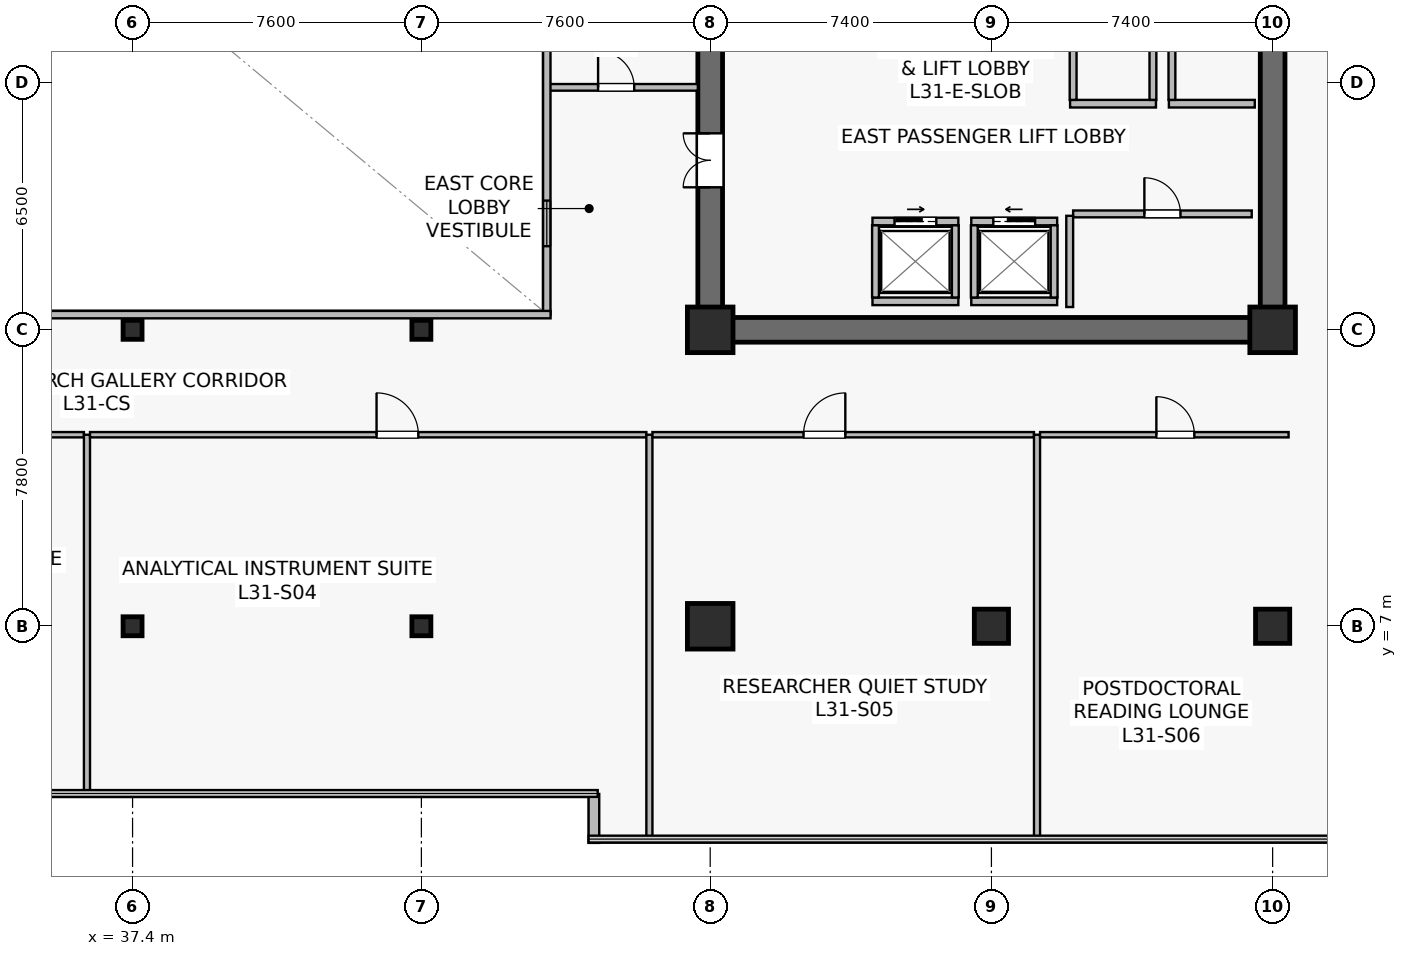
"""IFC4 building model, lengths in metres.
Left out: names, types, materials, properties, quantities, classifications, styles, units other than length and angle.
Written with IfcOpenShell. Run it as: python <this file> out.ifc"""

import sys

from ifc_helpers import new_model, si_unit, direction, frame, frame_2d, origin, origin_2d, place, context, subcontext, project, spatial, rectangle, hollow_rectangle, extrude, source, transform, mapped, element, fill, save


model = new_model("IFC4")
c1 = context("Model", 3, precision=1e-05, world=origin(), true_north=direction((0.0, 1.0)))
c2 = subcontext(c1, "Body", "Model", "MODEL_VIEW")
j1 = project(units=[si_unit("LENGTHUNIT", "METRE"), si_unit("PLANEANGLEUNIT", "RADIAN")], contexts=[c1])
p1 = place(None, origin())
s1 = spatial("IfcSite", under=j1, at=p1, CompositionType="ELEMENT")
p2 = place(p1, origin())
s2 = spatial("IfcBuilding", under=s1, at=p2, CompositionType="ELEMENT")
p3 = place(p2, frame((0.0, 0.0, 129.7)))
s3 = spatial("IfcBuildingStorey", under=s2, at=p3, CompositionType="ELEMENT", Elevation=129.7)
p4 = place(p3, frame((52.275, 14.8, 0.0), z_axis=(0.0, 0.0, 1.0), x_axis=(1.0, 0.0, 0.0)))
e1 = element("IfcWall", 1, at=p4, inside=s3, PredefinedType="SHEAR", context=c2, shape_type="SweptSolid", body=[
    extrude(rectangle(XDim=15.45, YDim=0.65, at=frame_2d((7.725, 0.0))), origin(), (0.0, 0.0, 1.0), 3.79),
])
p5 = place(p3, frame((52.6, 15.125, 0.0), z_axis=(0.0, 0.0, 1.0), x_axis=(0.0, 1.0, 0.0)))
e2 = element("IfcWall", 2, at=p5, inside=s3, PredefinedType="SHEAR", context=c2, shape_type="SweptSolid", body=[
    extrude(rectangle(XDim=18.35, YDim=0.65, at=frame_2d((9.175, 0.0))), origin(), (0.0, 0.0, 1.0), 3.79),
])
p6 = place(p5, frame((3.425, 0.0, 0.0)))
e3 = element("IfcOpeningElement", 3, at=p6, cuts=e2, PredefinedType="OPENING", context=c2, shape_type="SweptSolid", body=[
    extrude(rectangle(XDim=1.42, YDim=2.2, at=frame_2d((0.71, 1.1))), frame((0.0, 0.335, 0.0), z_axis=(0.0, -1.0, 0.0), x_axis=(1.0, 0.0, 0.0)), (0.0, 0.0, 1.0), 0.67),
])
p7 = place(p3, frame((67.4, 15.125, 0.0), z_axis=(0.0, 0.0, 1.0), x_axis=(0.0, 1.0, 0.0)))
e4 = element("IfcWall", 4, at=p7, inside=s3, PredefinedType="SHEAR", context=c2, shape_type="SweptSolid", body=[
    extrude(rectangle(XDim=18.35, YDim=0.65, at=frame_2d((9.175, 0.0))), origin(), (0.0, 0.0, 1.0), 3.79),
])
m1 = source(origin(), c2, "Body", "SweptSolid", [
    extrude(rectangle(XDim=1.2, YDim=1.2, at=origin_2d()), origin(), (0.0, 0.0, 1.0), 4.1),
])
p8 = place(p3, frame((52.6, 7.0, 0.0), z_axis=(0.0, 0.0, 1.0), x_axis=(1.0, 0.0, 0.0)))
e5 = element("IfcColumn", 5, at=p8, inside=s3, PredefinedType="COLUMN", context=c2, shape_type="MappedRepresentation", body=[
    mapped(m1, transform((0.0, 0.0, 0.0), scale=1.0)),
])
m2 = source(origin(), c2, "Body", "SweptSolid", [
    extrude(rectangle(XDim=0.9, YDim=0.9, at=origin_2d()), origin(), (0.0, 0.0, 1.0), 4.1),
])
p9 = place(p3, frame((60.0, 7.0, 0.0), z_axis=(0.0, 0.0, 1.0), x_axis=(1.0, 0.0, 0.0)))
e6 = element("IfcColumn", 6, at=p9, inside=s3, PredefinedType="COLUMN", context=c2, shape_type="MappedRepresentation", body=[
    mapped(m2, transform((0.0, 0.0, 0.0), scale=1.0)),
])
for number, where, z_axis, x_axis in (
    (7, (52.6, 14.8, 0.0), (0.0, 0.0, 1.0), (1.0, 0.0, 0.0)),
    (8, (67.4, 14.8, 0.0), (0.0, 0.0, 1.0), (1.0, 0.0, 0.0)),
):
    element("IfcColumn", number, at=place(p3, frame(where, z_axis=z_axis, x_axis=x_axis)), inside=s3, PredefinedType="COLUMN", context=c2, shape_type="MappedRepresentation", body=[
        mapped(m1, transform((0.0, 0.0, 0.0), scale=1.0)),
    ])
p10 = place(p3, frame((67.4, 7.0, 0.0), z_axis=(0.0, 0.0, 1.0), x_axis=(1.0, 0.0, 0.0)))
e9 = element("IfcColumn", 9, at=p10, inside=s3, PredefinedType="COLUMN", context=c2, shape_type="MappedRepresentation", body=[
    mapped(m2, transform((0.0, 0.0, 0.0), scale=1.0)),
])
m3 = source(origin(), c2, "Body", "SweptSolid", [
    extrude(hollow_rectangle(XDim=0.5, YDim=0.5, WallThickness=0.022, at=origin_2d()), origin(), (0.0, 0.0, 1.0), 4.1),
])
for number, where, z_axis, x_axis in (
    (10, (37.4, 7.0, 0.0), (0.0, 0.0, 1.0), (1.0, 0.0, 0.0)),
    (11, (37.4, 14.8, 0.0), (0.0, 0.0, 1.0), (1.0, 0.0, 0.0)),
    (12, (45.0, 7.0, 0.0), (0.0, 0.0, 1.0), (1.0, 0.0, 0.0)),
    (13, (45.0, 14.8, 0.0), (0.0, 0.0, 1.0), (1.0, 0.0, 0.0)),
):
    element("IfcColumn", number, at=place(p3, frame(where, z_axis=z_axis, x_axis=x_axis)), inside=s3, PredefinedType="COLUMN", context=c2, shape_type="MappedRepresentation", body=[
        mapped(m3, transform((0.0, 0.0, 0.0), scale=1.0)),
    ])
p11 = place(p3, frame((49.54, 2.588, 0.0), z_axis=(0.0, 0.0, 1.0), x_axis=(0.0, -1.0, 0.0)))
e14 = element("IfcWall", 14, at=p11, inside=s3, PredefinedType="STANDARD", context=c2, shape_type="SweptSolid", body=[
    extrude(rectangle(XDim=1.288, YDim=0.28, at=frame_2d((0.644, 0.0))), origin(), (0.0, 0.0, 1.0), 3.79),
])
p12 = place(p3, frame((59.47, 17.65, 0.0), z_axis=(0.0, 0.0, 1.0), x_axis=(1.0, 0.0, 0.0)))
e15 = element("IfcWall", 15, at=p12, inside=s3, PredefinedType="SOLIDWALL", context=c2, shape_type="SweptSolid", body=[
    extrude(rectangle(XDim=2.26, YDim=0.2, at=frame_2d((1.13, 0.0))), origin(), (0.0, 0.0, 1.0), 3.125),
])
p13 = place(p12, frame((0.58, 0.0, 0.0)))
e16 = element("IfcOpeningElement", 16, at=p13, cuts=e15, PredefinedType="OPENING", context=c2, shape_type="SweptSolid", body=[
    extrude(rectangle(XDim=1.1, YDim=2.22, at=frame_2d((0.55, 1.11))), frame((0.0, 0.11, 0.0), z_axis=(0.0, -1.0, 0.0), x_axis=(1.0, 0.0, 0.0)), (0.0, 0.0, 1.0), 0.22),
])
p14 = place(p3, frame((59.47, 15.55, 0.0), z_axis=(0.0, 0.0, 1.0), x_axis=(1.0, 0.0, 0.0)))
e17 = element("IfcWall", 17, at=p14, inside=s3, PredefinedType="SOLIDWALL", context=c2, shape_type="SweptSolid", body=[
    extrude(rectangle(XDim=2.26, YDim=0.2, at=frame_2d((1.13, 0.0))), origin(), (0.0, 0.0, 1.0), 3.125),
])
for number, where, z_axis, x_axis in (
    (18, (59.55, 15.65, 0.0), (0.0, 0.0, 1.0), (0.0, 1.0, 0.0)),
    (19, (61.65, 15.65, 0.0), (0.0, 0.0, 1.0), (0.0, 1.0, 0.0)),
):
    element("IfcWall", number, at=place(p3, frame(where, z_axis=z_axis, x_axis=x_axis)), inside=s3, PredefinedType="SOLIDWALL", context=c2, shape_type="SweptSolid", body=[
        extrude(rectangle(XDim=1.9, YDim=0.18, at=frame_2d((0.95, 0.0))), origin(), (0.0, 0.0, 1.0), 3.79),
    ])
p15 = place(p3, frame((56.87, 17.65, 0.0), z_axis=(0.0, 0.0, 1.0), x_axis=(1.0, 0.0, 0.0)))
e20 = element("IfcWall", 20, at=p15, inside=s3, PredefinedType="SOLIDWALL", context=c2, shape_type="SweptSolid", body=[
    extrude(rectangle(XDim=2.26, YDim=0.2, at=frame_2d((1.13, 0.0))), origin(), (0.0, 0.0, 1.0), 3.79),
])
p16 = place(p15, frame((0.58, 0.0, 0.0)))
e21 = element("IfcOpeningElement", 21, at=p16, cuts=e20, PredefinedType="OPENING", context=c2, shape_type="SweptSolid", body=[
    extrude(rectangle(XDim=1.1, YDim=2.22, at=frame_2d((0.55, 1.11))), frame((0.0, 0.11, 0.0), z_axis=(0.0, -1.0, 0.0), x_axis=(1.0, 0.0, 0.0)), (0.0, 0.0, 1.0), 0.22),
])
p17 = place(p3, frame((56.87, 15.55, 0.0), z_axis=(0.0, 0.0, 1.0), x_axis=(1.0, 0.0, 0.0)))
e22 = element("IfcWall", 22, at=p17, inside=s3, PredefinedType="SOLIDWALL", context=c2, shape_type="SweptSolid", body=[
    extrude(rectangle(XDim=2.26, YDim=0.2, at=frame_2d((1.13, 0.0))), origin(), (0.0, 0.0, 1.0), 3.79),
])
for number, where, z_axis, x_axis in (
    (23, (56.95, 15.65, 0.0), (0.0, 0.0, 1.0), (0.0, 1.0, 0.0)),
    (24, (59.05, 15.65, 0.0), (0.0, 0.0, 1.0), (0.0, 1.0, 0.0)),
):
    element("IfcWall", number, at=place(p3, frame(where, z_axis=z_axis, x_axis=x_axis)), inside=s3, PredefinedType="SOLIDWALL", context=c2, shape_type="SweptSolid", body=[
        extrude(rectangle(XDim=1.9, YDim=0.18, at=frame_2d((0.95, 0.0))), origin(), (0.0, 0.0, 1.0), 3.79),
    ])
p18 = place(p3, frame((64.67, 20.75, 0.0), z_axis=(0.0, 0.0, 1.0), x_axis=(1.0, 0.0, 0.0)))
e25 = element("IfcWall", 25, at=p18, inside=s3, PredefinedType="SOLIDWALL", context=c2, shape_type="SweptSolid", body=[
    extrude(rectangle(XDim=2.26, YDim=0.2, at=frame_2d((1.13, 0.0))), origin(), (0.0, 0.0, 1.0), 3.79),
])
p19 = place(p3, frame((64.75, 20.85, 0.0), z_axis=(0.0, 0.0, 1.0), x_axis=(0.0, 1.0, 0.0)))
e26 = element("IfcWall", 26, at=p19, inside=s3, PredefinedType="SOLIDWALL", context=c2, shape_type="SweptSolid", body=[
    extrude(rectangle(XDim=1.9, YDim=0.18, at=frame_2d((0.95, 0.0))), origin(), (0.0, 0.0, 1.0), 3.79),
])
p20 = place(p3, frame((62.07, 20.75, 0.0), z_axis=(0.0, 0.0, 1.0), x_axis=(1.0, 0.0, 0.0)))
e27 = element("IfcWall", 27, at=p20, inside=s3, PredefinedType="SOLIDWALL", context=c2, shape_type="SweptSolid", body=[
    extrude(rectangle(XDim=2.26, YDim=0.2, at=frame_2d((1.13, 0.0))), origin(), (0.0, 0.0, 1.0), 3.79),
])
for number, where, z_axis, x_axis in (
    (28, (62.15, 20.85, 0.0), (0.0, 0.0, 1.0), (0.0, 1.0, 0.0)),
    (29, (64.25, 20.85, 0.0), (0.0, 0.0, 1.0), (0.0, 1.0, 0.0)),
):
    element("IfcWall", number, at=place(p3, frame(where, z_axis=z_axis, x_axis=x_axis)), inside=s3, PredefinedType="SOLIDWALL", context=c2, shape_type="SweptSolid", body=[
        extrude(rectangle(XDim=1.9, YDim=0.18, at=frame_2d((0.95, 0.0))), origin(), (0.0, 0.0, 1.0), 3.79),
    ])
p21 = place(p3, frame((62.15, 17.85, 0.0), z_axis=(0.0, 0.0, 1.0), x_axis=(1.0, 0.0, 0.0)))
e30 = element("IfcWall", 30, at=p21, inside=s3, PredefinedType="SOLIDWALL", context=c2, shape_type="SweptSolid", body=[
    extrude(rectangle(XDim=4.7, YDim=0.18, at=frame_2d((2.35, 0.0))), origin(), (0.0, 0.0, 1.0), 3.79),
])
p22 = place(p21, frame((1.875, 0.0, 0.0)))
e31 = element("IfcOpeningElement", 31, at=p22, cuts=e30, PredefinedType="OPENING", context=c2, shape_type="SweptSolid", body=[
    extrude(rectangle(XDim=0.95, YDim=2.15, at=frame_2d((0.475, 1.075))), frame((0.0, 0.1, 0.0), z_axis=(0.0, -1.0, 0.0), x_axis=(1.0, 0.0, 0.0)), (0.0, 0.0, 1.0), 0.2),
])
p23 = place(p3, frame((62.06, 15.4, 0.0), z_axis=(0.0, 0.0, 1.0), x_axis=(0.0, 1.0, 0.0)))
e32 = element("IfcWall", 32, at=p23, inside=s3, PredefinedType="SOLIDWALL", context=c2, shape_type="SweptSolid", body=[
    extrude(rectangle(XDim=2.4, YDim=0.18, at=frame_2d((1.2, 0.0))), origin(), (0.0, 0.0, 1.0), 3.79),
])
p24 = place(p3, frame((48.3, 21.18, 0.0), z_axis=(0.0, 0.0, 1.0), x_axis=(1.0, 0.0, 0.0)))
e33 = element("IfcWall", 33, at=p24, inside=s3, PredefinedType="PARTITIONING", context=c2, shape_type="SweptSolid", body=[
    extrude(rectangle(XDim=3.975, YDim=0.175, at=frame_2d((1.987, 0.0))), origin(), (0.0, 0.0, 1.0), 3.79),
])
p25 = place(p24, frame((1.35, 0.0, 0.0)))
e34 = element("IfcOpeningElement", 34, at=p25, cuts=e33, PredefinedType="OPENING", context=c2, shape_type="SweptSolid", body=[
    extrude(rectangle(XDim=0.95, YDim=2.15, at=frame_2d((0.475, 1.075))), frame((0.0, 0.098, 0.0), z_axis=(0.0, -1.0, 0.0), x_axis=(1.0, 0.0, 0.0)), (0.0, 0.0, 1.0), 0.195),
])
p26 = place(p3, frame((48.3, 15.2, 0.0), z_axis=(0.0, 0.0, 1.0), x_axis=(0.0, 1.0, 0.0)))
e35 = element("IfcWall", 35, at=p26, inside=s3, PredefinedType="SOLIDWALL", context=c2, shape_type="SweptSolid", body=[
    extrude(rectangle(XDim=18.2, YDim=0.195, at=frame_2d((9.1, 0.0))), origin(), (0.0, 0.0, 1.0), 3.79),
])
p27 = place(p26, frame((1.8, 0.0, 0.9)))
e36 = element("IfcOpeningElement", 36, at=p27, cuts=e35, PredefinedType="OPENING", context=c2, shape_type="SweptSolid", body=[
    extrude(rectangle(XDim=1.2, YDim=1.35, at=frame_2d((0.6, 0.675))), frame((0.0, 0.107, 0.0), z_axis=(0.0, -1.0, 0.0), x_axis=(1.0, 0.0, 0.0)), (0.0, 0.0, 1.0), 0.215),
])
p28 = place(p26, frame((13.2, 0.0, 0.9)))
e37 = element("IfcOpeningElement", 37, at=p28, cuts=e35, PredefinedType="OPENING", context=c2, shape_type="SweptSolid", body=[
    extrude(rectangle(XDim=1.2, YDim=1.35, at=frame_2d((0.6, 0.675))), frame((0.0, 0.107, 0.0), z_axis=(0.0, -1.0, 0.0), x_axis=(1.0, 0.0, 0.0)), (0.0, 0.0, 1.0), 0.215),
])
p29 = place(p3, frame((26.4, 15.2, 0.0), z_axis=(0.0, 0.0, 1.0), x_axis=(1.0, 0.0, 0.0)))
e38 = element("IfcWall", 38, at=p29, inside=s3, PredefinedType="SOLIDWALL", context=c2, shape_type="SweptSolid", body=[
    extrude(rectangle(XDim=22.0, YDim=0.195, at=frame_2d((11.0, 0.0))), origin(), (0.0, 0.0, 1.0), 3.79),
])
p30 = place(p3, frame((23.48, 12.04, 0.0), z_axis=(0.0, 0.0, 1.0), x_axis=(1.0, 0.0, 0.0)))
e39 = element("IfcWall", 39, at=p30, inside=s3, PredefinedType="PARTITIONING", context=c2, shape_type="SweptSolid", body=[
    extrude(rectangle(XDim=12.64, YDim=0.14, at=frame_2d((6.32, 0.0))), origin(), (0.0, 0.0, 1.0), 3.125),
])
p31 = place(p30, frame((5.12, 0.0, 0.0)))
e40 = element("IfcOpeningElement", 40, at=p31, cuts=e39, PredefinedType="OPENING", context=c2, shape_type="SweptSolid", body=[
    extrude(rectangle(XDim=1.1, YDim=2.18, at=frame_2d((0.55, 1.09))), frame((0.0, 0.08, 0.0), z_axis=(0.0, -1.0, 0.0), x_axis=(1.0, 0.0, 0.0)), (0.0, 0.0, 1.0), 0.16),
])
p32 = place(p3, frame((36.2, 2.61, 0.0), z_axis=(0.0, 0.0, 1.0), x_axis=(0.0, 1.0, 0.0)))
e41 = element("IfcWall", 41, at=p32, inside=s3, PredefinedType="PARTITIONING", context=c2, shape_type="SweptSolid", body=[
    extrude(rectangle(XDim=9.43, YDim=0.16, at=frame_2d((4.715, 0.0))), origin(), (0.0, 0.0, 1.0), 3.075),
])
p33 = place(p3, frame((36.28, 12.04, 0.0), z_axis=(0.0, 0.0, 1.0), x_axis=(1.0, 0.0, 0.0)))
e42 = element("IfcWall", 42, at=p33, inside=s3, PredefinedType="PARTITIONING", context=c2, shape_type="SweptSolid", body=[
    extrude(rectangle(XDim=14.64, YDim=0.14, at=frame_2d((7.32, 0.0))), origin(), (0.0, 0.0, 1.0), 3.125),
])
p34 = place(p33, frame((7.54, 0.0, 0.0)))
e43 = element("IfcOpeningElement", 43, at=p34, cuts=e42, PredefinedType="OPENING", context=c2, shape_type="SweptSolid", body=[
    extrude(rectangle(XDim=1.1, YDim=2.18, at=frame_2d((0.55, 1.09))), frame((0.0, 0.08, 0.0), z_axis=(0.0, -1.0, 0.0), x_axis=(1.0, 0.0, 0.0)), (0.0, 0.0, 1.0), 0.16),
])
p35 = place(p3, frame((51.0, 1.41, 0.0), z_axis=(0.0, 0.0, 1.0), x_axis=(0.0, 1.0, 0.0)))
e44 = element("IfcWall", 44, at=p35, inside=s3, PredefinedType="PARTITIONING", context=c2, shape_type="SweptSolid", body=[
    extrude(rectangle(XDim=10.63, YDim=0.16, at=frame_2d((5.315, 0.0))), origin(), (0.0, 0.0, 1.0), 3.075),
])
p36 = place(p3, frame((51.08, 12.04, 0.0), z_axis=(0.0, 0.0, 1.0), x_axis=(1.0, 0.0, 0.0)))
e45 = element("IfcWall", 45, at=p36, inside=s3, PredefinedType="PARTITIONING", context=c2, shape_type="SweptSolid", body=[
    extrude(rectangle(XDim=10.04, YDim=0.14, at=frame_2d((5.02, 0.0))), origin(), (0.0, 0.0, 1.0), 3.125),
])
p37 = place(p36, frame((3.976, 0.0, 0.0)))
e46 = element("IfcOpeningElement", 46, at=p37, cuts=e45, PredefinedType="OPENING", context=c2, shape_type="SweptSolid", body=[
    extrude(rectangle(XDim=1.1, YDim=2.18, at=frame_2d((0.55, 1.09))), frame((0.0, 0.08, 0.0), z_axis=(0.0, -1.0, 0.0), x_axis=(1.0, 0.0, 0.0)), (0.0, 0.0, 1.0), 0.16),
])
p38 = place(p3, frame((61.2, 1.41, 0.0), z_axis=(0.0, 0.0, 1.0), x_axis=(0.0, 1.0, 0.0)))
e47 = element("IfcWall", 47, at=p38, inside=s3, PredefinedType="PARTITIONING", context=c2, shape_type="SweptSolid", body=[
    extrude(rectangle(XDim=10.63, YDim=0.16, at=frame_2d((5.315, 0.0))), origin(), (0.0, 0.0, 1.0), 3.075),
])
p39 = place(p3, frame((61.28, 12.04, 0.0), z_axis=(0.0, 0.0, 1.0), x_axis=(1.0, 0.0, 0.0)))
e48 = element("IfcWall", 48, at=p39, inside=s3, PredefinedType="PARTITIONING", context=c2, shape_type="SweptSolid", body=[
    extrude(rectangle(XDim=6.54, YDim=0.14, at=frame_2d((3.27, 0.0))), origin(), (0.0, 0.0, 1.0), 3.275),
])
p40 = place(p39, frame((3.06, 0.0, 0.0)))
e49 = element("IfcOpeningElement", 49, at=p40, cuts=e48, PredefinedType="OPENING", context=c2, shape_type="SweptSolid", body=[
    extrude(rectangle(XDim=1.0, YDim=2.15, at=frame_2d((0.5, 1.075))), frame((0.0, 0.08, 0.0), z_axis=(0.0, -1.0, 0.0), x_axis=(1.0, 0.0, 0.0)), (0.0, 0.0, 1.0), 0.16),
])
m4 = source(origin(), c2, "Body", "SweptSolid", [
    extrude(rectangle(XDim=1.2, YDim=1.35, at=frame_2d((0.6, 0.675))), frame((0.0, 0.03, 0.0), z_axis=(0.0, -1.0, 0.0), x_axis=(1.0, 0.0, 0.0)), (0.0, 0.0, 1.0), 0.06),
])
p41 = place(p27, origin())
e50 = element("IfcWindow", 50, at=p41, inside=s3, PartitioningType="SINGLE_PANEL", PredefinedType="WINDOW", context=c2, shape_type="MappedRepresentation", body=[
    mapped(m4, transform((0.0, 0.0, 0.0), scale=1.0)),
])
fill(e36, e50)
m5 = source(origin(), c2, "Body", "SweptSolid", [
    extrude(rectangle(XDim=1.1, YDim=2.22, at=frame_2d((0.55, 1.11))), frame((0.0, 0.025, 0.0), z_axis=(0.0, -1.0, 0.0), x_axis=(1.0, 0.0, 0.0)), (0.0, 0.0, 1.0), 0.05),
])
p42 = place(p13, origin())
e51 = element("IfcDoor", 51, at=p42, inside=s3, OperationType="SLIDING_TO_LEFT", PredefinedType="USERDEFINED", context=c2, shape_type="MappedRepresentation", body=[
    mapped(m5, transform((0.0, 0.0, 0.0), scale=1.0)),
])
fill(e16, e51)
p43 = place(p16, origin())
e52 = element("IfcDoor", 52, at=p43, inside=s3, OperationType="SLIDING_TO_RIGHT", PredefinedType="USERDEFINED", context=c2, shape_type="MappedRepresentation", body=[
    mapped(m5, transform((0.0, 0.0, 0.0), scale=1.0)),
])
fill(e21, e52)
m6 = source(origin(), c2, "Body", "SweptSolid", [
    extrude(rectangle(XDim=0.95, YDim=2.15, at=frame_2d((0.475, 1.075))), frame((0.0, 0.025, 0.0), z_axis=(0.0, -1.0, 0.0), x_axis=(1.0, 0.0, 0.0)), (0.0, 0.0, 1.0), 0.05),
])
p44 = place(p22, origin())
e53 = element("IfcDoor", 53, at=p44, inside=s3, OperationType="SINGLE_SWING_LEFT", PredefinedType="DOOR", context=c2, shape_type="MappedRepresentation", body=[
    mapped(m6, transform((0.0, 0.0, 0.0), scale=1.0)),
])
fill(e31, e53)
m7 = source(origin(), c2, "Body", "SweptSolid", [
    extrude(rectangle(XDim=1.42, YDim=2.2, at=frame_2d((0.71, 1.1))), frame((0.0, 0.025, 0.0), z_axis=(0.0, -1.0, 0.0), x_axis=(1.0, 0.0, 0.0)), (0.0, 0.0, 1.0), 0.05),
])
p45 = place(p6, origin())
e54 = element("IfcDoor", 54, at=p45, inside=s3, OperationType="DOUBLE_DOOR_SINGLE_SWING", PredefinedType="DOOR", context=c2, shape_type="MappedRepresentation", body=[
    mapped(m7, transform((0.0, 0.0, 0.0), scale=1.0)),
])
fill(e3, e54)
p46 = place(p25, origin())
e55 = element("IfcDoor", 55, at=p46, inside=s3, OperationType="SINGLE_SWING_LEFT", PredefinedType="DOOR", context=c2, shape_type="MappedRepresentation", body=[
    mapped(m6, transform((0.0, 0.0, 0.0), scale=1.0)),
])
fill(e34, e55)
m8 = source(origin(), c2, "Body", "SweptSolid", [
    extrude(rectangle(XDim=1.1, YDim=2.18, at=frame_2d((0.55, 1.09))), frame((0.0, 0.025, 0.0), z_axis=(0.0, -1.0, 0.0), x_axis=(1.0, 0.0, 0.0)), (0.0, 0.0, 1.0), 0.05),
])
p47 = place(p34, origin())
e56 = element("IfcDoor", 56, at=p47, inside=s3, OperationType="SINGLE_SWING_LEFT", PredefinedType="DOOR", context=c2, shape_type="MappedRepresentation", body=[
    mapped(m8, transform((0.0, 0.0, 0.0), scale=1.0)),
])
fill(e43, e56)
p48 = place(p37, origin())
e57 = element("IfcDoor", 57, at=p48, inside=s3, OperationType="SINGLE_SWING_RIGHT", PredefinedType="DOOR", context=c2, shape_type="MappedRepresentation", body=[
    mapped(m8, transform((0.0, 0.0, 0.0), scale=1.0)),
])
fill(e46, e57)
m9 = source(origin(), c2, "Body", "SweptSolid", [
    extrude(rectangle(XDim=1.0, YDim=2.15, at=frame_2d((0.5, 1.075))), frame((0.0, 0.025, 0.0), z_axis=(0.0, -1.0, 0.0), x_axis=(1.0, 0.0, 0.0)), (0.0, 0.0, 1.0), 0.05),
])
p49 = place(p40, origin())
e58 = element("IfcDoor", 58, at=p49, inside=s3, OperationType="SINGLE_SWING_LEFT", PredefinedType="DOOR", context=c2, shape_type="MappedRepresentation", body=[
    mapped(m9, transform((0.0, 0.0, 0.0), scale=1.0)),
])
fill(e49, e58)
save(model, sys.argv[1])
